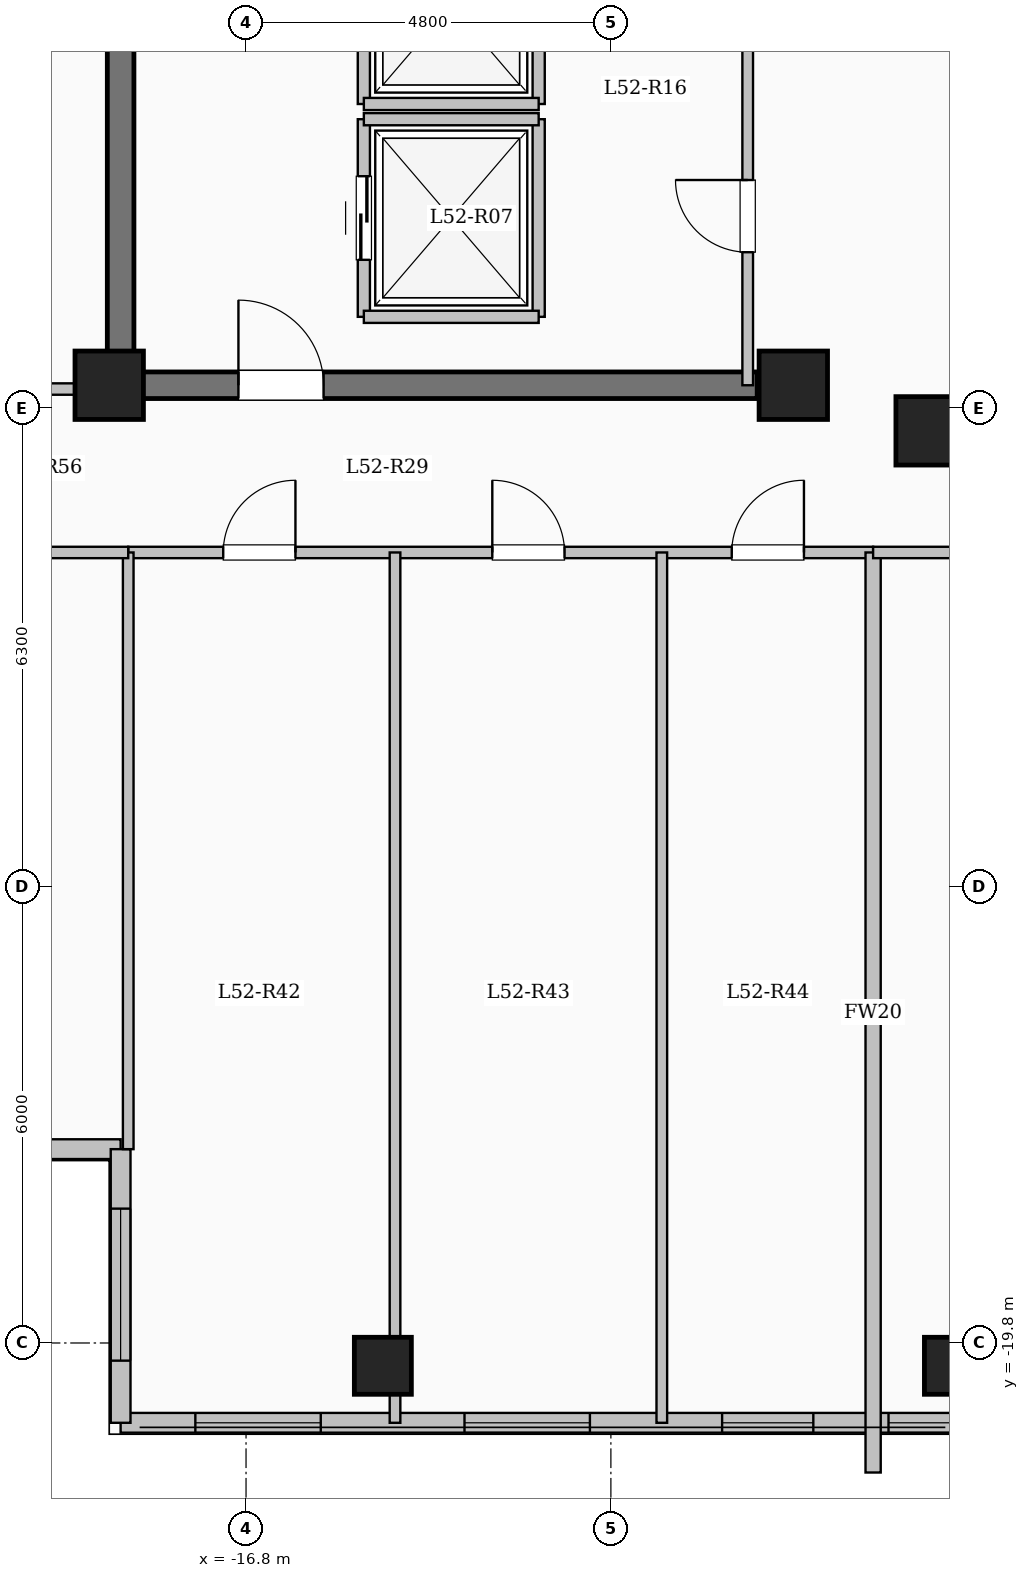
"""IFC4 building model, lengths in metres.
Left out: names, types, materials, properties, quantities, classifications, styles, units other than length and angle.
Written with IfcOpenShell. Run it as: python <this file> out.ifc"""

import sys

from ifc_helpers import new_model, si_unit, direction, frame, frame_2d, origin, origin_2d, place, context, subcontext, project, spatial, rectangle, extrude, element, fill, save


model = new_model("IFC4")
c1 = context("Model", 3, precision=1e-05, world=origin(), true_north=direction((0.0, 1.0)))
c2 = subcontext(c1, "Body", "Model", "MODEL_VIEW")
j1 = project(units=[si_unit("LENGTHUNIT", "METRE"), si_unit("PLANEANGLEUNIT", "RADIAN")], contexts=[c1])
p1 = place(None, origin())
s1 = spatial("IfcSite", under=j1, at=p1, CompositionType="ELEMENT")
p2 = place(p1, origin())
s2 = spatial("IfcBuilding", under=s1, at=p2, CompositionType="ELEMENT")
p3 = place(p2, frame((0.0, 0.0, 193.6)))
s3 = spatial("IfcBuildingStorey", under=s2, at=p3, CompositionType="ELEMENT", Elevation=193.6)
for number, where, z_axis, x_axis in (
    (1, (-7.8, -7.8, 0.0), (0.0, 0.0, 1.0), (1.0, 0.0, 0.0)),
    (2, (-9.6, -7.2, 0.0), (0.0, 0.0, 1.0), (1.0, 0.0, 0.0)),
    (3, (-18.6, -7.2, 0.0), (0.0, 0.0, 1.0), (1.0, 0.0, 0.0)),
):
    element("IfcColumn", number, at=place(p3, frame(where, z_axis=z_axis, x_axis=x_axis)), inside=s3, PredefinedType="COLUMN", context=c2, shape_type="SweptSolid", body=[
        extrude(rectangle(XDim=0.9, YDim=0.9, at=origin_2d()), origin(), (0.0, 0.0, 1.0), 3.35),
    ])
for number, where, z_axis, x_axis in (
    (4, (-15.0, -20.1, 0.0), (0.0, 0.0, 1.0), (1.0, 0.0, 0.0)),
    (5, (-7.5, -20.1, 0.0), (0.0, 0.0, 1.0), (1.0, 0.0, 0.0)),
):
    element("IfcColumn", number, at=place(p3, frame(where, z_axis=z_axis, x_axis=x_axis)), inside=s3, PredefinedType="COLUMN", context=c2, shape_type="SweptSolid", body=[
        extrude(rectangle(XDim=0.75, YDim=0.75, at=origin_2d()), origin(), (0.0, 0.0, 1.0), 3.35),
    ])
p4 = place(p3, frame((-18.45, -17.25, 0.0), z_axis=(0.0, 0.0, 1.0), x_axis=(-1.0, 0.0, 0.0)))
e6 = element("IfcWall", 6, at=p4, inside=s3, PredefinedType="SOLIDWALL", context=c2, shape_type="SweptSolid", body=[
    extrude(rectangle(XDim=5.1, YDim=0.26, at=frame_2d((2.55, 0.0))), origin(), (0.0, 0.0, 1.0), 3.1),
])
p5 = place(p4, frame((1.425, 0.0, 0.9)))
e7 = element("IfcOpeningElement", 7, at=p5, cuts=e6, PredefinedType="OPENING", context=c2, shape_type="SweptSolid", body=[
    extrude(rectangle(XDim=2.2, YDim=1.75, at=frame_2d((1.1, 0.875))), frame((0.0, 0.14, 0.0), z_axis=(0.0, -1.0, 0.0), x_axis=(1.0, 0.0, 0.0)), (0.0, 0.0, 1.0), 0.28),
])
p6 = place(p3, frame((-7.35, -20.85, 0.0), z_axis=(0.0, 0.0, 1.0), x_axis=(-1.0, 0.0, 0.0)))
e8 = element("IfcWall", 8, at=p6, inside=s3, PredefinedType="SOLIDWALL", context=c2, shape_type="SweptSolid", body=[
    extrude(rectangle(XDim=11.1, YDim=0.26, at=frame_2d((5.55, 0.0))), origin(), (0.0, 0.0, 1.0), 3.1),
])
p7 = place(p6, frame((0.147, 0.0, 0.95)))
e9 = element("IfcOpeningElement", 9, at=p7, cuts=e8, PredefinedType="OPENING", context=c2, shape_type="SweptSolid", body=[
    extrude(rectangle(XDim=0.85, YDim=1.5, at=frame_2d((0.425, 0.75))), frame((0.0, 0.14, 0.0), z_axis=(0.0, -1.0, 0.0), x_axis=(1.0, 0.0, 0.0)), (0.0, 0.0, 1.0), 0.28),
])
p8 = place(p6, frame((1.987, 0.0, 0.95)))
e10 = element("IfcOpeningElement", 10, at=p8, cuts=e8, PredefinedType="OPENING", context=c2, shape_type="SweptSolid", body=[
    extrude(rectangle(XDim=1.2, YDim=1.5, at=frame_2d((0.6, 0.75))), frame((0.0, 0.14, 0.0), z_axis=(0.0, -1.0, 0.0), x_axis=(1.0, 0.0, 0.0)), (0.0, 0.0, 1.0), 0.28),
])
p9 = place(p6, frame((4.926, 0.0, 0.9)))
e11 = element("IfcOpeningElement", 11, at=p9, cuts=e8, PredefinedType="OPENING", context=c2, shape_type="SweptSolid", body=[
    extrude(rectangle(XDim=1.65, YDim=1.6, at=frame_2d((0.825, 0.8))), frame((0.0, 0.14, 0.0), z_axis=(0.0, -1.0, 0.0), x_axis=(1.0, 0.0, 0.0)), (0.0, 0.0, 1.0), 0.28),
])
p10 = place(p6, frame((8.467, 0.0, 0.9)))
e12 = element("IfcOpeningElement", 12, at=p10, cuts=e8, PredefinedType="OPENING", context=c2, shape_type="SweptSolid", body=[
    extrude(rectangle(XDim=1.65, YDim=1.6, at=frame_2d((0.825, 0.8))), frame((0.0, 0.14, 0.0), z_axis=(0.0, -1.0, 0.0), x_axis=(1.0, 0.0, 0.0)), (0.0, 0.0, 1.0), 0.28),
])
p11 = place(p3, frame((-18.45, -20.85, 0.0), z_axis=(0.0, 0.0, 1.0), x_axis=(0.0, 1.0, 0.0)))
e13 = element("IfcWall", 13, at=p11, inside=s3, PredefinedType="SOLIDWALL", context=c2, shape_type="SweptSolid", body=[
    extrude(rectangle(XDim=3.6, YDim=0.26, at=frame_2d((1.8, 0.0))), origin(), (0.0, 0.0, 1.0), 3.1),
])
p12 = place(p11, frame((0.817, 0.0, 0.9)))
e14 = element("IfcOpeningElement", 14, at=p12, cuts=e13, PredefinedType="OPENING", context=c2, shape_type="SweptSolid", body=[
    extrude(rectangle(XDim=2.0, YDim=1.7, at=frame_2d((1.0, 0.85))), frame((0.0, 0.14, 0.0), z_axis=(0.0, -1.0, 0.0), x_axis=(1.0, 0.0, 0.0)), (0.0, 0.0, 1.0), 0.28),
])
p13 = place(p3, frame((-15.25, -6.3, 0.0), z_axis=(0.0, 0.0, 1.0), x_axis=(0.0, 1.0, 0.0)))
e15 = element("IfcWall", 15, at=p13, inside=s3, PredefinedType="SOLIDWALL", context=c2, shape_type="SweptSolid", body=[
    extrude(rectangle(XDim=2.6, YDim=0.16, at=frame_2d((1.3, 0.0))), origin(), (0.0, 0.0, 1.0), 3.1),
])
p14 = place(p13, frame((0.75, 0.0, 0.0)))
e16 = element("IfcOpeningElement", 16, at=p14, cuts=e15, PredefinedType="OPENING", context=c2, shape_type="SweptSolid", body=[
    extrude(rectangle(XDim=1.1, YDim=2.15, at=frame_2d((0.55, 1.075))), frame((0.0, 0.09, 0.0), z_axis=(0.0, -1.0, 0.0), x_axis=(1.0, 0.0, 0.0)), (0.0, 0.0, 1.0), 0.18),
])
p15 = place(p3, frame((-12.95, -6.3, 0.0), z_axis=(0.0, 0.0, 1.0), x_axis=(0.0, 1.0, 0.0)))
e17 = element("IfcWall", 17, at=p15, inside=s3, PredefinedType="SOLIDWALL", context=c2, shape_type="SweptSolid", body=[
    extrude(rectangle(XDim=2.6, YDim=0.16, at=frame_2d((1.3, 0.0))), origin(), (0.0, 0.0, 1.0), 3.1),
])
for number, where, z_axis, x_axis in (
    (18, (-15.25, -6.3, 0.0), (0.0, 0.0, 1.0), (1.0, 0.0, 0.0)),
    (19, (-15.25, -3.7, 0.0), (0.0, 0.0, 1.0), (1.0, 0.0, 0.0)),
):
    element("IfcWall", number, at=place(p3, frame(where, z_axis=z_axis, x_axis=x_axis)), inside=s3, PredefinedType="SOLIDWALL", context=c2, shape_type="SweptSolid", body=[
        extrude(rectangle(XDim=2.3, YDim=0.16, at=frame_2d((1.15, 0.0))), origin(), (0.0, 0.0, 1.0), 3.1),
    ])
p16 = place(p3, frame((-15.25, -3.5, 0.0), z_axis=(0.0, 0.0, 1.0), x_axis=(0.0, 1.0, 0.0)))
e20 = element("IfcWall", 20, at=p16, inside=s3, PredefinedType="SOLIDWALL", context=c2, shape_type="SweptSolid", body=[
    extrude(rectangle(XDim=2.6, YDim=0.16, at=frame_2d((1.3, 0.0))), origin(), (0.0, 0.0, 1.0), 3.1),
])
p17 = place(p16, frame((0.75, 0.0, 0.0)))
e21 = element("IfcOpeningElement", 21, at=p17, cuts=e20, PredefinedType="OPENING", context=c2, shape_type="SweptSolid", body=[
    extrude(rectangle(XDim=1.1, YDim=2.15, at=frame_2d((0.55, 1.075))), frame((0.0, 0.09, 0.0), z_axis=(0.0, -1.0, 0.0), x_axis=(1.0, 0.0, 0.0)), (0.0, 0.0, 1.0), 0.18),
])
p18 = place(p3, frame((-12.95, -3.5, 0.0), z_axis=(0.0, 0.0, 1.0), x_axis=(0.0, 1.0, 0.0)))
e22 = element("IfcWall", 22, at=p18, inside=s3, PredefinedType="SOLIDWALL", context=c2, shape_type="SweptSolid", body=[
    extrude(rectangle(XDim=2.6, YDim=0.16, at=frame_2d((1.3, 0.0))), origin(), (0.0, 0.0, 1.0), 3.1),
])
p19 = place(p3, frame((-15.25, -3.5, 0.0), z_axis=(0.0, 0.0, 1.0), x_axis=(1.0, 0.0, 0.0)))
e23 = element("IfcWall", 23, at=p19, inside=s3, PredefinedType="SOLIDWALL", context=c2, shape_type="SweptSolid", body=[
    extrude(rectangle(XDim=2.3, YDim=0.16, at=frame_2d((1.15, 0.0))), origin(), (0.0, 0.0, 1.0), 3.1),
])
p20 = place(p3, frame((-18.45, -7.375, 0.0), z_axis=(0.0, 0.0, 1.0), x_axis=(0.0, 1.0, 0.0)))
e24 = element("IfcWall", 24, at=p20, inside=s3, PredefinedType="SHEAR", context=c2, shape_type="SweptSolid", body=[
    extrude(rectangle(XDim=14.05, YDim=0.35, at=frame_2d((7.025, 0.0))), origin(), (0.0, 0.0, 1.0), 3.35),
])
p21 = place(p3, frame((-18.625, -7.2, 0.0), z_axis=(0.0, 0.0, 1.0), x_axis=(1.0, 0.0, 0.0)))
e25 = element("IfcWall", 25, at=p21, inside=s3, PredefinedType="SHEAR", context=c2, shape_type="SweptSolid", body=[
    extrude(rectangle(XDim=8.55, YDim=0.35, at=frame_2d((4.275, 0.0))), origin(), (0.0, 0.0, 1.0), 3.35),
])
p22 = place(p21, frame((1.725, 0.0, 0.0)))
e26 = element("IfcOpeningElement", 26, at=p22, cuts=e25, PredefinedType="OPENING", context=c2, shape_type="SweptSolid", body=[
    extrude(rectangle(XDim=1.12, YDim=2.15, at=frame_2d((0.56, 1.075))), frame((0.0, 0.185, 0.0), z_axis=(0.0, -1.0, 0.0), x_axis=(1.0, 0.0, 0.0)), (0.0, 0.0, 1.0), 0.37),
])
p23 = place(p3, frame((-10.2, -7.2, 0.0), z_axis=(0.0, 0.0, 1.0), x_axis=(0.0, 1.0, 0.0)))
e27 = element("IfcWall", 27, at=p23, inside=s3, PredefinedType="PARTITIONING", context=c2, shape_type="SweptSolid", body=[
    extrude(rectangle(XDim=9.12, YDim=0.14, at=frame_2d((4.56, 0.0))), origin(), (0.0, 0.0, 1.0), 3.1),
])
p24 = place(p23, frame((1.75, 0.0, 0.0)))
e28 = element("IfcOpeningElement", 28, at=p24, cuts=e27, PredefinedType="OPENING", context=c2, shape_type="SweptSolid", body=[
    extrude(rectangle(XDim=0.95, YDim=2.12, at=frame_2d((0.475, 1.06))), frame((0.0, 0.08, 0.0), z_axis=(0.0, -1.0, 0.0), x_axis=(1.0, 0.0, 0.0)), (0.0, 0.0, 1.0), 0.16),
])
p25 = place(p23, frame((6.6, 0.0, 0.0)))
e29 = element("IfcOpeningElement", 29, at=p25, cuts=e27, PredefinedType="OPENING", context=c2, shape_type="SweptSolid", body=[
    extrude(rectangle(XDim=0.95, YDim=2.12, at=frame_2d((0.475, 1.06))), frame((0.0, 0.08, 0.0), z_axis=(0.0, -1.0, 0.0), x_axis=(1.0, 0.0, 0.0)), (0.0, 0.0, 1.0), 0.16),
])
p26 = place(p3, frame((-18.35, -9.4, 0.0), z_axis=(0.0, 0.0, 1.0), x_axis=(1.0, 0.0, 0.0)))
e30 = element("IfcWall", 30, at=p26, inside=s3, PredefinedType="PARTITIONING", context=c2, shape_type="SweptSolid", body=[
    extrude(rectangle(XDim=9.8, YDim=0.15, at=frame_2d((4.9, 0.0))), origin(), (0.0, 0.0, 1.0), 3.1),
])
p27 = place(p26, frame((1.25, 0.0, 0.0)))
e31 = element("IfcOpeningElement", 31, at=p27, cuts=e30, PredefinedType="OPENING", context=c2, shape_type="SweptSolid", body=[
    extrude(rectangle(XDim=0.95, YDim=2.15, at=frame_2d((0.475, 1.075))), frame((0.0, 0.085, 0.0), z_axis=(0.0, -1.0, 0.0), x_axis=(1.0, 0.0, 0.0)), (0.0, 0.0, 1.0), 0.17),
])
p28 = place(p26, frame((4.79, 0.0, 0.0)))
e32 = element("IfcOpeningElement", 32, at=p28, cuts=e30, PredefinedType="OPENING", context=c2, shape_type="SweptSolid", body=[
    extrude(rectangle(XDim=0.95, YDim=2.15, at=frame_2d((0.475, 1.075))), frame((0.0, 0.085, 0.0), z_axis=(0.0, -1.0, 0.0), x_axis=(1.0, 0.0, 0.0)), (0.0, 0.0, 1.0), 0.17),
])
p29 = place(p26, frame((7.94, 0.0, 0.0)))
e33 = element("IfcOpeningElement", 33, at=p29, cuts=e30, PredefinedType="OPENING", context=c2, shape_type="SweptSolid", body=[
    extrude(rectangle(XDim=0.95, YDim=2.15, at=frame_2d((0.475, 1.075))), frame((0.0, 0.085, 0.0), z_axis=(0.0, -1.0, 0.0), x_axis=(1.0, 0.0, 0.0)), (0.0, 0.0, 1.0), 0.17),
])
p30 = place(p3, frame((-14.84, -20.85, 0.0), z_axis=(0.0, 0.0, 1.0), x_axis=(0.0, 1.0, 0.0)))
e34 = element("IfcWall", 34, at=p30, inside=s3, PredefinedType="PARTITIONING", context=c2, shape_type="SweptSolid", body=[
    extrude(rectangle(XDim=11.45, YDim=0.14, at=frame_2d((5.725, 0.0))), origin(), (0.0, 0.0, 1.0), 2.585),
])
p31 = place(p3, frame((-11.33, -20.85, 0.0), z_axis=(0.0, 0.0, 1.0), x_axis=(0.0, 1.0, 0.0)))
e35 = element("IfcWall", 35, at=p31, inside=s3, PredefinedType="PARTITIONING", context=c2, shape_type="SweptSolid", body=[
    extrude(rectangle(XDim=11.45, YDim=0.14, at=frame_2d((5.725, 0.0))), origin(), (0.0, 0.0, 1.0), 3.1),
])
p32 = place(p3, frame((-8.55, -21.504, 0.0), z_axis=(0.0, 0.0, 1.0), x_axis=(0.0, 1.0, 0.0)))
e36 = element("IfcWall", 36, at=p32, inside=s3, PredefinedType="SOLIDWALL", context=c2, shape_type="SweptSolid", body=[
    extrude(rectangle(XDim=12.104, YDim=0.2, at=frame_2d((6.052, 0.0))), origin(), (0.0, 0.0, 1.0), 3.1),
])
p33 = place(p3, frame((-8.55, -9.4, 0.0), z_axis=(0.0, 0.0, 1.0), x_axis=(1.0, 0.0, 0.0)))
e37 = element("IfcWall", 37, at=p33, inside=s3, PredefinedType="PARTITIONING", context=c2, shape_type="SweptSolid", body=[
    extrude(rectangle(XDim=17.1, YDim=0.15, at=frame_2d((8.55, 0.0))), origin(), (0.0, 0.0, 1.0), 3.1),
])
p34 = place(p33, frame((1.9, 0.0, 0.0)))
e38 = element("IfcOpeningElement", 38, at=p34, cuts=e37, PredefinedType="OPENING", context=c2, shape_type="SweptSolid", body=[
    extrude(rectangle(XDim=0.95, YDim=2.15, at=frame_2d((0.475, 1.075))), frame((0.0, 0.085, 0.0), z_axis=(0.0, -1.0, 0.0), x_axis=(1.0, 0.0, 0.0)), (0.0, 0.0, 1.0), 0.17),
])
p35 = place(p33, frame((10.5, 0.0, 0.0)))
e39 = element("IfcOpeningElement", 39, at=p35, cuts=e37, PredefinedType="OPENING", context=c2, shape_type="SweptSolid", body=[
    extrude(rectangle(XDim=0.95, YDim=2.15, at=frame_2d((0.475, 1.075))), frame((0.0, 0.085, 0.0), z_axis=(0.0, -1.0, 0.0), x_axis=(1.0, 0.0, 0.0)), (0.0, 0.0, 1.0), 0.17),
])
p36 = place(p3, frame((-23.58, -7.25, 0.0), z_axis=(0.0, 0.0, 1.0), x_axis=(1.0, 0.0, 0.0)))
e40 = element("IfcWall", 40, at=p36, inside=s3, PredefinedType="PARTITIONING", context=c2, shape_type="SweptSolid", body=[
    extrude(rectangle(XDim=5.13, YDim=0.15, at=frame_2d((2.565, 0.0))), origin(), (0.0, 0.0, 1.0), 3.1),
])
p37 = place(p36, frame((2.08, 0.0, 0.0)))
e41 = element("IfcOpeningElement", 41, at=p37, cuts=e40, PredefinedType="OPENING", context=c2, shape_type="SweptSolid", body=[
    extrude(rectangle(XDim=1.08, YDim=2.15, at=frame_2d((0.54, 1.075))), frame((0.0, 0.085, 0.0), z_axis=(0.0, -1.0, 0.0), x_axis=(1.0, 0.0, 0.0)), (0.0, 0.0, 1.0), 0.17),
])
p38 = place(p3, frame((-18.35, -17.25, 0.0), z_axis=(0.0, 0.0, 1.0), x_axis=(0.0, 1.0, 0.0)))
e42 = element("IfcWall", 42, at=p38, inside=s3, PredefinedType="PARTITIONING", context=c2, shape_type="SweptSolid", body=[
    extrude(rectangle(XDim=7.85, YDim=0.14, at=frame_2d((3.925, 0.0))), origin(), (0.0, 0.0, 1.0), 3.1),
])
p39 = place(p3, frame((-23.58, -9.4, 0.0), z_axis=(0.0, 0.0, 1.0), x_axis=(1.0, 0.0, 0.0)))
e43 = element("IfcWall", 43, at=p39, inside=s3, PredefinedType="PARTITIONING", context=c2, shape_type="SweptSolid", body=[
    extrude(rectangle(XDim=5.23, YDim=0.15, at=frame_2d((2.615, 0.0))), origin(), (0.0, 0.0, 1.0), 3.1),
])
p40 = place(p39, frame((2.14, 0.0, 0.0)))
e44 = element("IfcOpeningElement", 44, at=p40, cuts=e43, PredefinedType="OPENING", context=c2, shape_type="SweptSolid", body=[
    extrude(rectangle(XDim=0.95, YDim=2.15, at=frame_2d((0.475, 1.075))), frame((0.0, 0.085, 0.0), z_axis=(0.0, -1.0, 0.0), x_axis=(1.0, 0.0, 0.0)), (0.0, 0.0, 1.0), 0.17),
])
p41 = place(p7, origin())
e45 = element("IfcWindow", 45, at=p41, inside=s3, PartitioningType="SINGLE_PANEL", PredefinedType="WINDOW", context=c2, shape_type="SweptSolid", body=[
    extrude(rectangle(XDim=0.85, YDim=1.5, at=frame_2d((0.425, 0.75))), frame((0.0, 0.03, 0.0), z_axis=(0.0, -1.0, 0.0), x_axis=(1.0, 0.0, 0.0)), (0.0, 0.0, 1.0), 0.06),
])
fill(e9, e45)
p42 = place(p8, origin())
e46 = element("IfcWindow", 46, at=p42, inside=s3, PartitioningType="SINGLE_PANEL", PredefinedType="WINDOW", context=c2, shape_type="SweptSolid", body=[
    extrude(rectangle(XDim=1.2, YDim=1.5, at=frame_2d((0.6, 0.75))), frame((0.0, 0.03, 0.0), z_axis=(0.0, -1.0, 0.0), x_axis=(1.0, 0.0, 0.0)), (0.0, 0.0, 1.0), 0.06),
])
fill(e10, e46)
p43 = place(p9, origin())
e47 = element("IfcWindow", 47, at=p43, inside=s3, PartitioningType="SINGLE_PANEL", PredefinedType="WINDOW", context=c2, shape_type="SweptSolid", body=[
    extrude(rectangle(XDim=1.65, YDim=1.6, at=frame_2d((0.825, 0.8))), frame((0.0, 0.03, 0.0), z_axis=(0.0, -1.0, 0.0), x_axis=(1.0, 0.0, 0.0)), (0.0, 0.0, 1.0), 0.06),
])
fill(e11, e47)
p44 = place(p10, origin())
e48 = element("IfcWindow", 48, at=p44, inside=s3, PartitioningType="SINGLE_PANEL", PredefinedType="WINDOW", context=c2, shape_type="SweptSolid", body=[
    extrude(rectangle(XDim=1.65, YDim=1.6, at=frame_2d((0.825, 0.8))), frame((0.0, 0.03, 0.0), z_axis=(0.0, -1.0, 0.0), x_axis=(1.0, 0.0, 0.0)), (0.0, 0.0, 1.0), 0.06),
])
fill(e12, e48)
p45 = place(p12, origin())
e49 = element("IfcWindow", 49, at=p45, inside=s3, PartitioningType="SINGLE_PANEL", PredefinedType="WINDOW", context=c2, shape_type="SweptSolid", body=[
    extrude(rectangle(XDim=2.0, YDim=1.7, at=frame_2d((1.0, 0.85))), frame((0.0, 0.03, 0.0), z_axis=(0.0, -1.0, 0.0), x_axis=(1.0, 0.0, 0.0)), (0.0, 0.0, 1.0), 0.06),
])
fill(e14, e49)
p46 = place(p14, origin())
e50 = element("IfcDoor", 50, at=p46, inside=s3, OperationType="SLIDING_TO_LEFT", PredefinedType="DOOR", context=c2, shape_type="SweptSolid", body=[
    extrude(rectangle(XDim=1.1, YDim=2.15, at=frame_2d((0.55, 1.075))), frame((0.0, 0.025, 0.0), z_axis=(0.0, -1.0, 0.0), x_axis=(1.0, 0.0, 0.0)), (0.0, 0.0, 1.0), 0.05),
])
fill(e16, e50)
p47 = place(p22, origin())
e51 = element("IfcDoor", 51, at=p47, inside=s3, OperationType="SINGLE_SWING_LEFT", PredefinedType="DOOR", context=c2, shape_type="SweptSolid", body=[
    extrude(rectangle(XDim=1.12, YDim=2.15, at=frame_2d((0.56, 1.075))), frame((0.0, 0.025, 0.0), z_axis=(0.0, -1.0, 0.0), x_axis=(1.0, 0.0, 0.0)), (0.0, 0.0, 1.0), 0.05),
])
fill(e26, e51)
p48 = place(p24, origin())
e52 = element("IfcDoor", 52, at=p48, inside=s3, OperationType="SINGLE_SWING_RIGHT", PredefinedType="DOOR", context=c2, shape_type="SweptSolid", body=[
    extrude(rectangle(XDim=0.95, YDim=2.12, at=frame_2d((0.475, 1.06))), frame((0.0, 0.025, 0.0), z_axis=(0.0, -1.0, 0.0), x_axis=(1.0, 0.0, 0.0)), (0.0, 0.0, 1.0), 0.05),
])
fill(e28, e52)
p49 = place(p27, origin())
e53 = element("IfcDoor", 53, at=p49, inside=s3, OperationType="SINGLE_SWING_RIGHT", PredefinedType="DOOR", context=c2, shape_type="SweptSolid", body=[
    extrude(rectangle(XDim=0.95, YDim=2.15, at=frame_2d((0.475, 1.075))), frame((0.0, 0.025, 0.0), z_axis=(0.0, -1.0, 0.0), x_axis=(1.0, 0.0, 0.0)), (0.0, 0.0, 1.0), 0.05),
])
fill(e31, e53)
p50 = place(p28, origin())
e54 = element("IfcDoor", 54, at=p50, inside=s3, OperationType="SINGLE_SWING_LEFT", PredefinedType="DOOR", context=c2, shape_type="SweptSolid", body=[
    extrude(rectangle(XDim=0.95, YDim=2.15, at=frame_2d((0.475, 1.075))), frame((0.0, 0.025, 0.0), z_axis=(0.0, -1.0, 0.0), x_axis=(1.0, 0.0, 0.0)), (0.0, 0.0, 1.0), 0.05),
])
fill(e32, e54)
p51 = place(p29, origin())
e55 = element("IfcDoor", 55, at=p51, inside=s3, OperationType="SINGLE_SWING_RIGHT", PredefinedType="DOOR", context=c2, shape_type="SweptSolid", body=[
    extrude(rectangle(XDim=0.95, YDim=2.15, at=frame_2d((0.475, 1.075))), frame((0.0, 0.025, 0.0), z_axis=(0.0, -1.0, 0.0), x_axis=(1.0, 0.0, 0.0)), (0.0, 0.0, 1.0), 0.05),
])
fill(e33, e55)
save(model, sys.argv[1])
